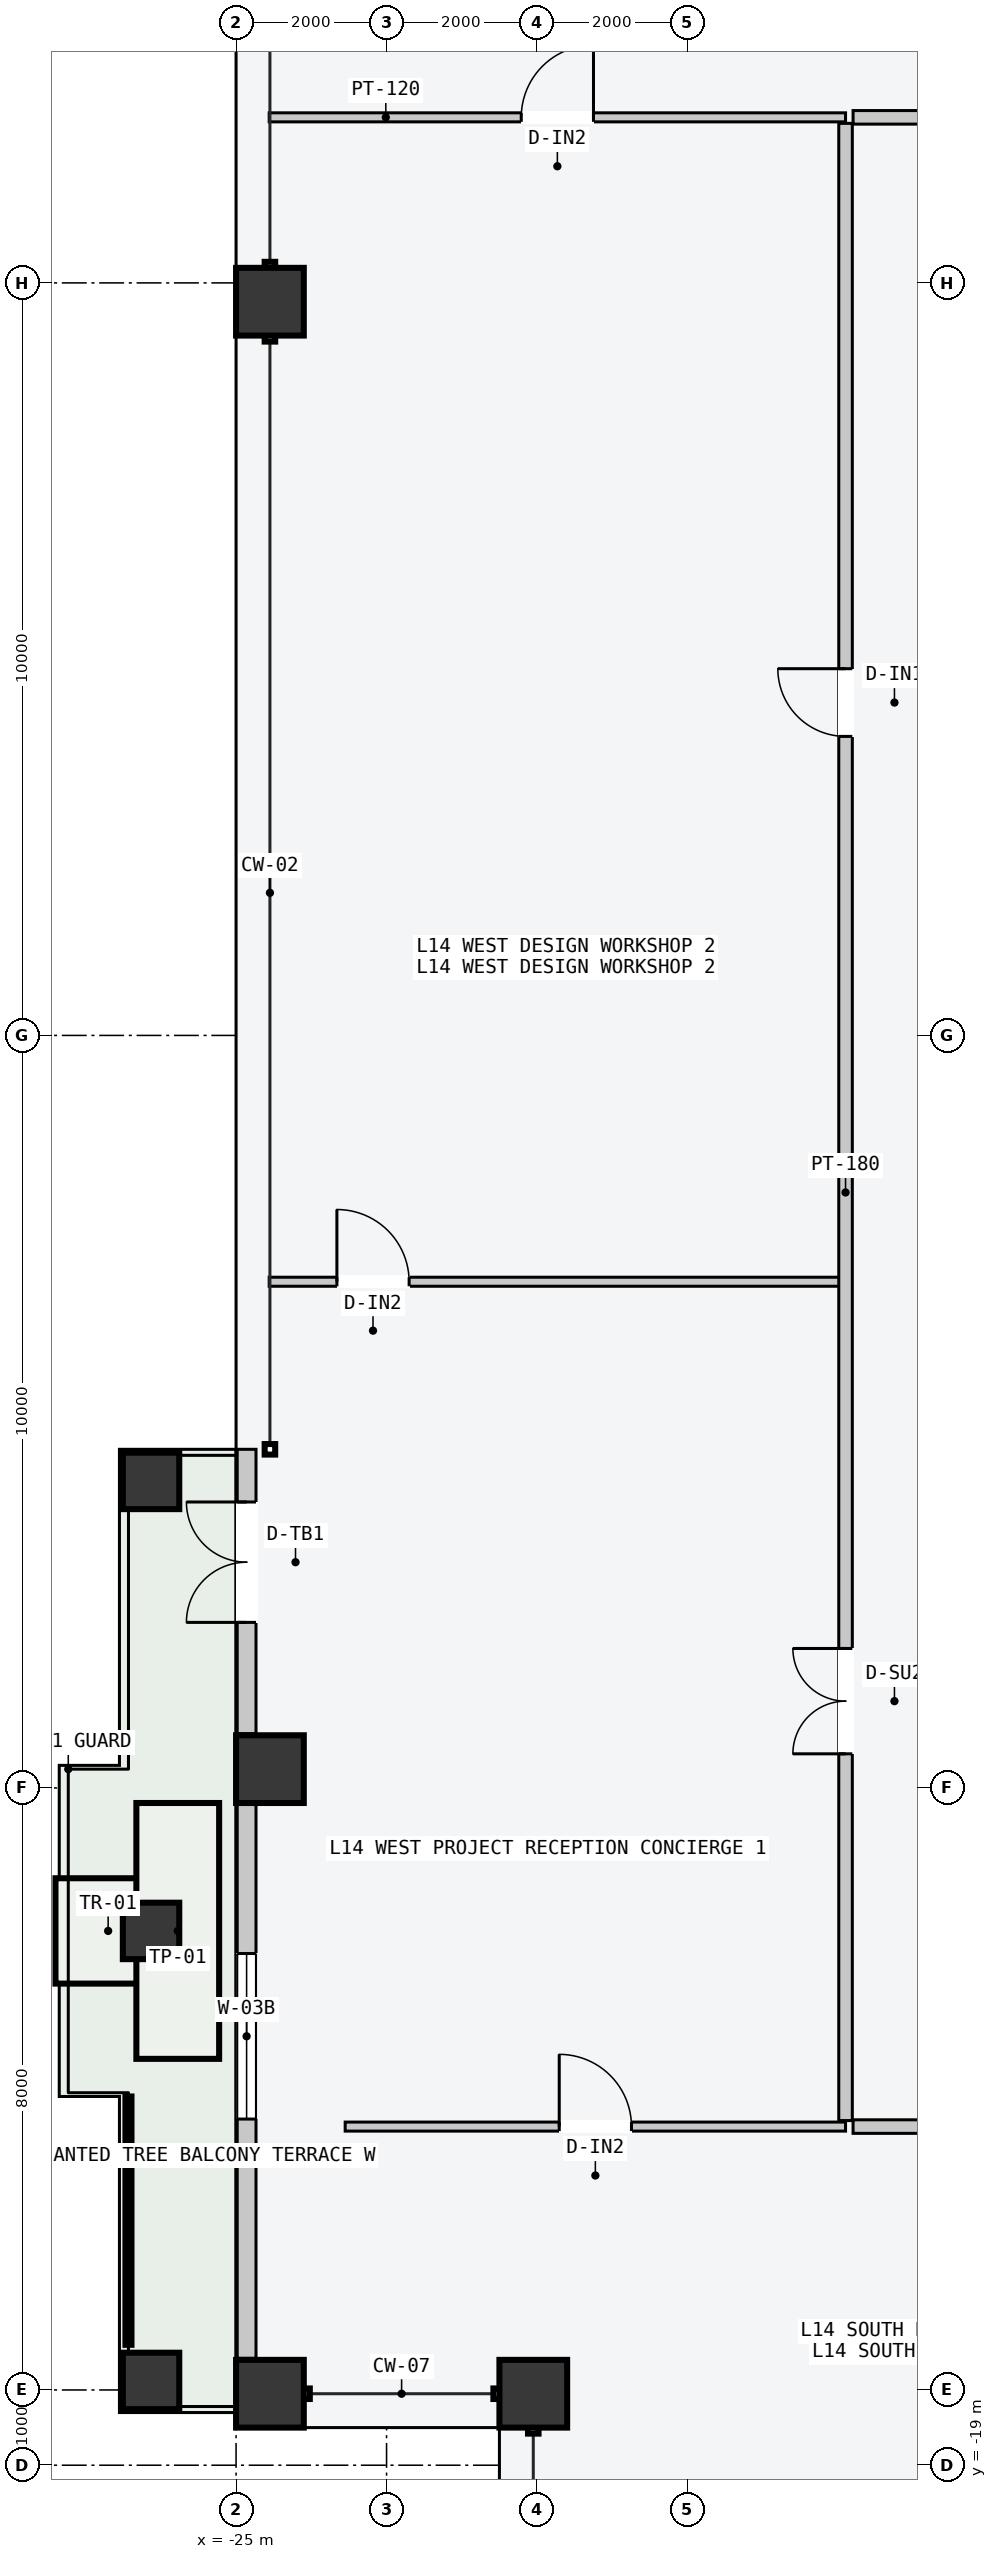
"""IFC4 building model, lengths in metres.
Left out: names, types, materials, properties, quantities, classifications, styles, units other than length and angle.
Written with IfcOpenShell. Run it as: python <this file> out.ifc"""

import sys

from ifc_helpers import new_model, si_unit, direction, frame, frame_2d, origin, origin_2d, place, context, subcontext, project, spatial, rectangle, hollow_rectangle, extrude, element, fill, save


model = new_model("IFC4")
c1 = context("Model", 3, precision=1e-05, world=origin(), true_north=direction((0.0, 1.0)))
c2 = subcontext(c1, "Body", "Model", "MODEL_VIEW")
j1 = project(units=[si_unit("LENGTHUNIT", "METRE"), si_unit("PLANEANGLEUNIT", "RADIAN")], contexts=[c1])
p1 = place(None, origin())
s1 = spatial("IfcSite", under=j1, at=p1, CompositionType="ELEMENT")
p2 = place(p1, origin())
s2 = spatial("IfcBuilding", under=s1, at=p2, CompositionType="ELEMENT")
p3 = place(p2, frame((0.0, 0.0, 56.4)))
s3 = spatial("IfcBuildingStorey", under=s2, at=p3, CompositionType="ELEMENT", Elevation=56.4)
for number, where, z_axis, x_axis in (
    (1, (-24.55, -18.05, 0.0), (0.0, 0.0, 1.0), (0.0, 1.0, 0.0)),
    (2, (-24.55, -9.75, 0.0), (0.0, 0.0, 1.0), (0.0, 1.0, 0.0)),
    (3, (-24.55, 9.75, 0.0), (0.0, 0.0, 1.0), (0.0, 1.0, 0.0)),
    (4, (-21.05, -18.05, 0.0), (0.0, 0.0, 1.0), (1.0, 0.0, 0.0)),
):
    element("IfcColumn", number, at=place(p3, frame(where, z_axis=z_axis, x_axis=x_axis)), inside=s3, PredefinedType="COLUMN", context=c2, shape_type="SweptSolid", body=[
        extrude(hollow_rectangle(XDim=0.9, YDim=0.9, WallThickness=0.045, at=origin_2d()), origin(), (0.0, 0.0, 1.0), 3.6),
    ])
for number, where, z_axis, x_axis in (
    (5, (-26.13, -17.88, -0.2), (0.0, 0.0, 1.0), (0.0, 1.0, 0.0)),
    (6, (-26.13, -5.92, -0.2), (0.0, 0.0, 1.0), (0.0, 1.0, 0.0)),
    (7, (-26.13, -11.9, -0.2), (0.0, 0.0, 1.0), (0.0, 1.0, 0.0)),
):
    element("IfcColumn", number, at=place(p3, frame(where, z_axis=z_axis, x_axis=x_axis)), inside=s3, PredefinedType="COLUMN", context=c2, shape_type="SweptSolid", body=[
        extrude(hollow_rectangle(XDim=0.75, YDim=0.75, WallThickness=0.032, at=origin_2d()), origin(), (0.0, 0.0, 1.0), 3.8),
    ])
p4 = place(p3, frame((-24.86, -17.58, 0.0), z_axis=(0.0, 0.0, 1.0), x_axis=(0.0, 1.0, 0.0)))
e8 = element("IfcWall", 8, at=p4, inside=s3, PredefinedType="STANDARD", context=c2, shape_type="SweptSolid", body=[
    extrude(rectangle(XDim=7.36, YDim=0.25, at=frame_2d((3.68, 0.0))), origin(), (0.0, 0.0, 1.0), 3.4),
])
p5 = place(p4, frame((3.18, 0.0, 0.85)))
e9 = element("IfcOpeningElement", 9, at=p5, cuts=e8, PredefinedType="OPENING", context=c2, shape_type="SweptSolid", body=[
    extrude(rectangle(XDim=2.2, YDim=2.1, at=frame_2d((1.1, 1.05))), frame((0.0, 0.135, 0.0), z_axis=(0.0, -1.0, 0.0), x_axis=(1.0, 0.0, 0.0)), (0.0, 0.0, 1.0), 0.27),
])
p6 = place(p3, frame((-24.86, -9.28, 0.0), z_axis=(0.0, 0.0, 1.0), x_axis=(0.0, 1.0, 0.0)))
e10 = element("IfcWall", 10, at=p6, inside=s3, PredefinedType="STANDARD", context=c2, shape_type="SweptSolid", body=[
    extrude(rectangle(XDim=3.78, YDim=0.25, at=frame_2d((1.89, 0.0))), origin(), (0.0, 0.0, 1.0), 3.4),
])
p7 = place(p6, frame((1.48, 0.0, 0.0)))
e11 = element("IfcOpeningElement", 11, at=p7, cuts=e10, PredefinedType="OPENING", context=c2, shape_type="SweptSolid", body=[
    extrude(rectangle(XDim=1.6, YDim=2.2, at=frame_2d((0.8, 1.1))), frame((0.0, 0.135, 0.0), z_axis=(0.0, -1.0, 0.0), x_axis=(1.0, 0.0, 0.0)), (0.0, 0.0, 1.0), 0.27),
])
p8 = place(p3, frame((-16.8, 12.2, 0.0), z_axis=(0.0, 0.0, 1.0), x_axis=(1.0, 0.0, 0.0)))
e12 = element("IfcWall", 12, at=p8, inside=s3, PredefinedType="PARTITIONING", context=c2, shape_type="SweptSolid", body=[
    extrude(rectangle(XDim=33.6, YDim=0.18, at=frame_2d((16.8, 0.0))), origin(), (0.0, 0.0, 1.0), 3.4),
])
p9 = place(p8, frame((16.18, 0.0, 0.0)))
e13 = element("IfcOpeningElement", 13, at=p9, cuts=e12, PredefinedType="OPENING", context=c2, shape_type="SweptSolid", body=[
    extrude(rectangle(XDim=1.24, YDim=2.24, at=frame_2d((0.62, 1.12))), frame((0.0, 0.1, 0.0), z_axis=(0.0, -1.0, 0.0), x_axis=(1.0, 0.0, 0.0)), (0.0, 0.0, 1.0), 0.2),
])
p10 = place(p3, frame((-24.56, 12.2, 0.0), z_axis=(0.0, 0.0, 1.0), x_axis=(1.0, 0.0, 0.0)))
e14 = element("IfcWall", 14, at=p10, inside=s3, PredefinedType="PARTITIONING", context=c2, shape_type="SweptSolid", body=[
    extrude(rectangle(XDim=7.66, YDim=0.12, at=frame_2d((3.83, 0.0))), origin(), (0.0, 0.0, 1.0), 3.4),
])
p11 = place(p10, frame((3.35, 0.0, 0.0)))
e15 = element("IfcOpeningElement", 15, at=p11, cuts=e14, PredefinedType="OPENING", context=c2, shape_type="SweptSolid", body=[
    extrude(rectangle(XDim=0.96, YDim=2.18, at=frame_2d((0.48, 1.09))), frame((0.0, 0.07, 0.0), z_axis=(0.0, -1.0, 0.0), x_axis=(1.0, 0.0, 0.0)), (0.0, 0.0, 1.0), 0.14),
])
p12 = place(p3, frame((-16.8, -14.5, 0.0), z_axis=(0.0, 0.0, 1.0), x_axis=(1.0, 0.0, 0.0)))
e16 = element("IfcWall", 16, at=p12, inside=s3, PredefinedType="PARTITIONING", context=c2, shape_type="SweptSolid", body=[
    extrude(rectangle(XDim=33.6, YDim=0.18, at=frame_2d((16.8, 0.0))), origin(), (0.0, 0.0, 1.0), 3.4),
])
p13 = place(p12, frame((4.137, 0.0, 0.0)))
e17 = element("IfcOpeningElement", 17, at=p13, cuts=e16, PredefinedType="OPENING", context=c2, shape_type="SweptSolid", body=[
    extrude(rectangle(XDim=0.96, YDim=2.18, at=frame_2d((0.48, 1.09))), frame((0.0, 0.1, 0.0), z_axis=(0.0, -1.0, 0.0), x_axis=(1.0, 0.0, 0.0)), (0.0, 0.0, 1.0), 0.2),
])
p14 = place(p12, frame((13.901, 0.0, 0.0)))
e18 = element("IfcOpeningElement", 18, at=p14, cuts=e16, PredefinedType="OPENING", context=c2, shape_type="SweptSolid", body=[
    extrude(rectangle(XDim=1.02, YDim=2.2, at=frame_2d((0.51, 1.1))), frame((0.0, 0.1, 0.0), z_axis=(0.0, -1.0, 0.0), x_axis=(1.0, 0.0, 0.0)), (0.0, 0.0, 1.0), 0.2),
])
p15 = place(p12, frame((23.637, 0.0, 0.0)))
e19 = element("IfcOpeningElement", 19, at=p15, cuts=e16, PredefinedType="OPENING", context=c2, shape_type="SweptSolid", body=[
    extrude(rectangle(XDim=1.06, YDim=2.2, at=frame_2d((0.53, 1.1))), frame((0.0, 0.1, 0.0), z_axis=(0.0, -1.0, 0.0), x_axis=(1.0, 0.0, 0.0)), (0.0, 0.0, 1.0), 0.2),
])
p16 = place(p12, frame((30.553, 0.0, 0.0)))
e20 = element("IfcOpeningElement", 20, at=p16, cuts=e16, PredefinedType="OPENING", context=c2, shape_type="SweptSolid", body=[
    extrude(rectangle(XDim=1.24, YDim=2.24, at=frame_2d((0.62, 1.12))), frame((0.0, 0.1, 0.0), z_axis=(0.0, -1.0, 0.0), x_axis=(1.0, 0.0, 0.0)), (0.0, 0.0, 1.0), 0.2),
])
p17 = place(p3, frame((-23.55, -14.5, 0.0), z_axis=(0.0, 0.0, 1.0), x_axis=(1.0, 0.0, 0.0)))
e21 = element("IfcWall", 21, at=p17, inside=s3, PredefinedType="PARTITIONING", context=c2, shape_type="SweptSolid", body=[
    extrude(rectangle(XDim=6.65, YDim=0.12, at=frame_2d((3.325, 0.0))), origin(), (0.0, 0.0, 1.0), 3.4),
])
p18 = place(p17, frame((2.845, 0.0, 0.0)))
e22 = element("IfcOpeningElement", 22, at=p18, cuts=e21, PredefinedType="OPENING", context=c2, shape_type="SweptSolid", body=[
    extrude(rectangle(XDim=0.96, YDim=2.18, at=frame_2d((0.48, 1.09))), frame((0.0, 0.07, 0.0), z_axis=(0.0, -1.0, 0.0), x_axis=(1.0, 0.0, 0.0)), (0.0, 0.0, 1.0), 0.14),
])
p19 = place(p3, frame((-24.56, -3.273, 0.0), z_axis=(0.0, 0.0, 1.0), x_axis=(1.0, 0.0, 0.0)))
e23 = element("IfcWall", 23, at=p19, inside=s3, PredefinedType="PARTITIONING", context=c2, shape_type="SweptSolid", body=[
    extrude(rectangle(XDim=7.6, YDim=0.12, at=frame_2d((3.8, 0.0))), origin(), (0.0, 0.0, 1.0), 2.95),
])
p20 = place(p19, frame((0.9, 0.0, 0.0)))
e24 = element("IfcOpeningElement", 24, at=p20, cuts=e23, PredefinedType="OPENING", context=c2, shape_type="SweptSolid", body=[
    extrude(rectangle(XDim=0.96, YDim=2.18, at=frame_2d((0.48, 1.09))), frame((0.0, 0.07, 0.0), z_axis=(0.0, -1.0, 0.0), x_axis=(1.0, 0.0, 0.0)), (0.0, 0.0, 1.0), 0.14),
])
p21 = place(p3, frame((-16.9, -14.42, 0.0), z_axis=(0.0, 0.0, 1.0), x_axis=(0.0, 1.0, 0.0)))
e25 = element("IfcWall", 25, at=p21, inside=s3, PredefinedType="PARTITIONING", context=c2, shape_type="SweptSolid", body=[
    extrude(rectangle(XDim=26.54, YDim=0.18, at=frame_2d((13.27, 0.0))), origin(), (0.0, 0.0, 1.0), 3.4),
])
p22 = place(p21, frame((4.873, 0.0, 0.0)))
e26 = element("IfcOpeningElement", 26, at=p22, cuts=e25, PredefinedType="OPENING", context=c2, shape_type="SweptSolid", body=[
    extrude(rectangle(XDim=1.4, YDim=2.2, at=frame_2d((0.7, 1.1))), frame((0.0, 0.1, 0.0), z_axis=(0.0, -1.0, 0.0), x_axis=(1.0, 0.0, 0.0)), (0.0, 0.0, 1.0), 0.2),
])
p23 = place(p21, frame((18.393, 0.0, 0.0)))
e27 = element("IfcOpeningElement", 27, at=p23, cuts=e25, PredefinedType="OPENING", context=c2, shape_type="SweptSolid", body=[
    extrude(rectangle(XDim=0.9, YDim=2.15, at=frame_2d((0.45, 1.075))), frame((0.0, 0.1, 0.0), z_axis=(0.0, -1.0, 0.0), x_axis=(1.0, 0.0, 0.0)), (0.0, 0.0, 1.0), 0.2),
])
p24 = place(p5, origin())
e28 = element("IfcWindow", 28, at=p24, inside=s3, PartitioningType="SINGLE_PANEL", PredefinedType="WINDOW", context=c2, shape_type="SweptSolid", body=[
    extrude(rectangle(XDim=2.2, YDim=2.1, at=frame_2d((1.1, 1.05))), frame((0.0, 0.03, 0.0), z_axis=(0.0, -1.0, 0.0), x_axis=(1.0, 0.0, 0.0)), (0.0, 0.0, 1.0), 0.06),
])
fill(e9, e28)
p25 = place(p7, origin())
e29 = element("IfcDoor", 29, at=p25, inside=s3, OperationType="DOUBLE_DOOR_SINGLE_SWING", PredefinedType="DOOR", context=c2, shape_type="SweptSolid", body=[
    extrude(rectangle(XDim=1.6, YDim=2.2, at=frame_2d((0.8, 1.1))), frame((0.0, 0.025, 0.0), z_axis=(0.0, -1.0, 0.0), x_axis=(1.0, 0.0, 0.0)), (0.0, 0.0, 1.0), 0.05),
])
fill(e11, e29)
p26 = place(p11, origin())
e30 = element("IfcDoor", 30, at=p26, inside=s3, OperationType="SINGLE_SWING_RIGHT", PredefinedType="DOOR", context=c2, shape_type="SweptSolid", body=[
    extrude(rectangle(XDim=0.96, YDim=2.18, at=frame_2d((0.48, 1.09))), frame((0.0, 0.025, 0.0), z_axis=(0.0, -1.0, 0.0), x_axis=(1.0, 0.0, 0.0)), (0.0, 0.0, 1.0), 0.05),
])
fill(e15, e30)
p27 = place(p18, origin())
e31 = element("IfcDoor", 31, at=p27, inside=s3, OperationType="SINGLE_SWING_LEFT", PredefinedType="DOOR", context=c2, shape_type="SweptSolid", body=[
    extrude(rectangle(XDim=0.96, YDim=2.18, at=frame_2d((0.48, 1.09))), frame((0.0, 0.025, 0.0), z_axis=(0.0, -1.0, 0.0), x_axis=(1.0, 0.0, 0.0)), (0.0, 0.0, 1.0), 0.05),
])
fill(e22, e31)
p28 = place(p20, origin())
e32 = element("IfcDoor", 32, at=p28, inside=s3, OperationType="SINGLE_SWING_LEFT", PredefinedType="DOOR", context=c2, shape_type="SweptSolid", body=[
    extrude(rectangle(XDim=0.96, YDim=2.18, at=frame_2d((0.48, 1.09))), frame((0.0, 0.025, 0.0), z_axis=(0.0, -1.0, 0.0), x_axis=(1.0, 0.0, 0.0)), (0.0, 0.0, 1.0), 0.05),
])
fill(e24, e32)
p29 = place(p22, origin())
e33 = element("IfcDoor", 33, at=p29, inside=s3, OperationType="DOUBLE_DOOR_SINGLE_SWING", PredefinedType="DOOR", context=c2, shape_type="SweptSolid", body=[
    extrude(rectangle(XDim=1.4, YDim=2.2, at=frame_2d((0.7, 1.1))), frame((0.0, 0.025, 0.0), z_axis=(0.0, -1.0, 0.0), x_axis=(1.0, 0.0, 0.0)), (0.0, 0.0, 1.0), 0.05),
])
fill(e26, e33)
p30 = place(p23, origin())
e34 = element("IfcDoor", 34, at=p30, inside=s3, OperationType="SINGLE_SWING_RIGHT", PredefinedType="DOOR", context=c2, shape_type="SweptSolid", body=[
    extrude(rectangle(XDim=0.9, YDim=2.15, at=frame_2d((0.45, 1.075))), frame((0.0, 0.025, 0.0), z_axis=(0.0, -1.0, 0.0), x_axis=(1.0, 0.0, 0.0)), (0.0, 0.0, 1.0), 0.05),
])
fill(e27, e34)
save(model, sys.argv[1])
